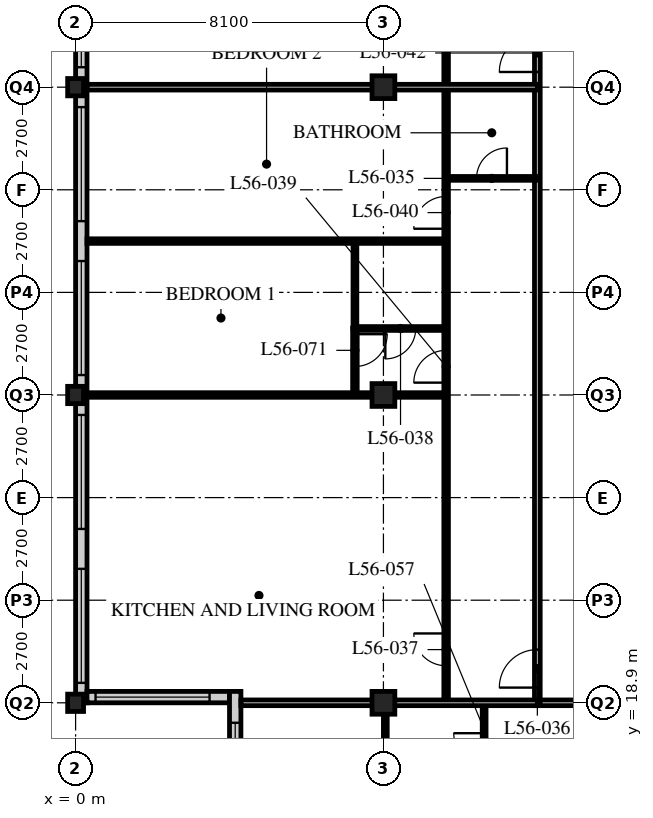
"""IFC4 building model, lengths in metres.
Left out: names, types, materials, properties, quantities, classifications, styles, units other than length and angle.
Written with IfcOpenShell. Run it as: python <this file> out.ifc"""

import sys

from ifc_helpers import new_model, si_unit, direction, frame, frame_2d, origin, origin_2d, place, context, subcontext, project, spatial, rectangle, hollow_rectangle, i_section, extrude, element, fill, save


model = new_model("IFC4")
c1 = context("Model", 3, precision=1e-05, world=origin(), true_north=direction((0.0, 1.0)))
c2 = subcontext(c1, "Body", "Model", "MODEL_VIEW")
j1 = project(units=[si_unit("LENGTHUNIT", "METRE"), si_unit("PLANEANGLEUNIT", "RADIAN")], contexts=[c1])
p1 = place(None, origin())
s1 = spatial("IfcSite", under=j1, at=p1, CompositionType="ELEMENT")
p2 = place(p1, origin())
s2 = spatial("IfcBuilding", under=s1, at=p2, CompositionType="ELEMENT")
p3 = place(p2, frame((0.0, 0.0, 217.2)))
s3 = spatial("IfcBuildingStorey", under=s2, at=p3, CompositionType="ELEMENT", Elevation=217.2)
for number, where, z_axis, x_axis in (
    (1, (0.0, 18.9, 0.0), (0.0, 0.0, 1.0), (1.0, 0.0, 0.0)),
    (2, (0.0, 27.0, 0.0), (0.0, 0.0, 1.0), (1.0, 0.0, 0.0)),
    (3, (0.0, 35.1, 0.0), (0.0, 0.0, 1.0), (1.0, 0.0, 0.0)),
):
    element("IfcColumn", number, at=place(p3, frame(where, z_axis=z_axis, x_axis=x_axis)), inside=s3, PredefinedType="COLUMN", context=c2, shape_type="SweptSolid", body=[
        extrude(i_section(OverallWidth=0.418, OverallDepth=0.456, WebThickness=0.042, FlangeThickness=0.067, FilletRadius=0.015, at=origin_2d()), origin(), (0.0, 0.0, 1.0), 3.6),
    ])
for number, where, z_axis, x_axis in (
    (4, (8.1, 18.9, 0.0), (0.0, 0.0, 1.0), (1.0, 0.0, 0.0)),
    (5, (8.1, 27.0, 0.0), (0.0, 0.0, 1.0), (1.0, 0.0, 0.0)),
    (6, (8.1, 35.1, 0.0), (0.0, 0.0, 1.0), (1.0, 0.0, 0.0)),
):
    element("IfcColumn", number, at=place(p3, frame(where, z_axis=z_axis, x_axis=x_axis)), inside=s3, PredefinedType="COLUMN", context=c2, shape_type="SweptSolid", body=[
        extrude(hollow_rectangle(XDim=0.6, YDim=0.6, WallThickness=0.05, at=origin_2d()), origin(), (0.0, 0.0, 1.0), 3.6),
    ])
p4 = place(p3, frame((0.15, 51.0, 0.0), z_axis=(0.0, 0.0, 1.0), x_axis=(0.0, -1.0, 0.0)))
e7 = element("IfcWall", 7, at=p4, inside=s3, PredefinedType="SOLIDWALL", context=c2, shape_type="SweptSolid", body=[
    extrude(rectangle(XDim=32.1, YDim=0.3, at=frame_2d((16.05, 0.0))), origin(), (0.0, 0.0, 1.0), 3.39),
])
p5 = place(p4, frame((0.225, 0.0, 0.6)))
e8 = element("IfcOpeningElement", 8, at=p5, cuts=e7, PredefinedType="OPENING", context=c2, shape_type="SweptSolid", body=[
    extrude(rectangle(XDim=3.0, YDim=2.4, at=frame_2d((1.5, 1.2))), frame((0.0, 0.16, 0.0), z_axis=(0.0, -1.0, 0.0), x_axis=(1.0, 0.0, 0.0)), (0.0, 0.0, 1.0), 0.32),
])
p6 = place(p4, frame((4.275, 0.0, 0.6)))
e9 = element("IfcOpeningElement", 9, at=p6, cuts=e7, PredefinedType="OPENING", context=c2, shape_type="SweptSolid", body=[
    extrude(rectangle(XDim=3.0, YDim=2.4, at=frame_2d((1.5, 1.2))), frame((0.0, 0.16, 0.0), z_axis=(0.0, -1.0, 0.0), x_axis=(1.0, 0.0, 0.0)), (0.0, 0.0, 1.0), 0.32),
])
p7 = place(p4, frame((8.325, 0.0, 0.6)))
e10 = element("IfcOpeningElement", 10, at=p7, cuts=e7, PredefinedType="OPENING", context=c2, shape_type="SweptSolid", body=[
    extrude(rectangle(XDim=3.0, YDim=2.4, at=frame_2d((1.5, 1.2))), frame((0.0, 0.16, 0.0), z_axis=(0.0, -1.0, 0.0), x_axis=(1.0, 0.0, 0.0)), (0.0, 0.0, 1.0), 0.32),
])
p8 = place(p4, frame((12.375, 0.0, 0.6)))
e11 = element("IfcOpeningElement", 11, at=p8, cuts=e7, PredefinedType="OPENING", context=c2, shape_type="SweptSolid", body=[
    extrude(rectangle(XDim=3.0, YDim=2.4, at=frame_2d((1.5, 1.2))), frame((0.0, 0.16, 0.0), z_axis=(0.0, -1.0, 0.0), x_axis=(1.0, 0.0, 0.0)), (0.0, 0.0, 1.0), 0.32),
])
p9 = place(p4, frame((16.425, 0.0, 0.6)))
e12 = element("IfcOpeningElement", 12, at=p9, cuts=e7, PredefinedType="OPENING", context=c2, shape_type="SweptSolid", body=[
    extrude(rectangle(XDim=3.0, YDim=2.4, at=frame_2d((1.5, 1.2))), frame((0.0, 0.16, 0.0), z_axis=(0.0, -1.0, 0.0), x_axis=(1.0, 0.0, 0.0)), (0.0, 0.0, 1.0), 0.32),
])
p10 = place(p4, frame((20.475, 0.0, 0.6)))
e13 = element("IfcOpeningElement", 13, at=p10, cuts=e7, PredefinedType="OPENING", context=c2, shape_type="SweptSolid", body=[
    extrude(rectangle(XDim=3.0, YDim=2.4, at=frame_2d((1.5, 1.2))), frame((0.0, 0.16, 0.0), z_axis=(0.0, -1.0, 0.0), x_axis=(1.0, 0.0, 0.0)), (0.0, 0.0, 1.0), 0.32),
])
p11 = place(p4, frame((24.525, 0.0, 0.6)))
e14 = element("IfcOpeningElement", 14, at=p11, cuts=e7, PredefinedType="OPENING", context=c2, shape_type="SweptSolid", body=[
    extrude(rectangle(XDim=3.0, YDim=2.4, at=frame_2d((1.5, 1.2))), frame((0.0, 0.16, 0.0), z_axis=(0.0, -1.0, 0.0), x_axis=(1.0, 0.0, 0.0)), (0.0, 0.0, 1.0), 0.32),
])
p12 = place(p4, frame((28.575, 0.0, 0.6)))
e15 = element("IfcOpeningElement", 15, at=p12, cuts=e7, PredefinedType="OPENING", context=c2, shape_type="SweptSolid", body=[
    extrude(rectangle(XDim=3.0, YDim=2.4, at=frame_2d((1.5, 1.2))), frame((0.0, 0.16, 0.0), z_axis=(0.0, -1.0, 0.0), x_axis=(1.0, 0.0, 0.0)), (0.0, 0.0, 1.0), 0.32),
])
p13 = place(p3, frame((0.3, 19.05, 0.0), z_axis=(0.0, 0.0, 1.0), x_axis=(1.0, 0.0, 0.0)))
e16 = element("IfcWall", 16, at=p13, inside=s3, PredefinedType="SOLIDWALL", context=c2, shape_type="SweptSolid", body=[
    extrude(rectangle(XDim=3.75, YDim=0.3, at=frame_2d((1.875, 0.0))), origin(), (0.0, 0.0, 1.0), 3.39),
])
p14 = place(p13, frame((0.225, 0.0, 0.6)))
e17 = element("IfcOpeningElement", 17, at=p14, cuts=e16, PredefinedType="OPENING", context=c2, shape_type="SweptSolid", body=[
    extrude(rectangle(XDim=3.0, YDim=2.0, at=frame_2d((1.5, 1.0))), frame((0.0, 0.16, 0.0), z_axis=(0.0, -1.0, 0.0), x_axis=(1.0, 0.0, 0.0)), (0.0, 0.0, 1.0), 0.32),
])
p15 = place(p3, frame((4.2, 19.2, 0.0), z_axis=(0.0, 0.0, 1.0), x_axis=(0.0, -1.0, 0.0)))
e18 = element("IfcWall", 18, at=p15, inside=s3, PredefinedType="SOLIDWALL", context=c2, shape_type="SweptSolid", body=[
    extrude(rectangle(XDim=4.35, YDim=0.3, at=frame_2d((2.175, 0.0))), origin(), (0.0, 0.0, 1.0), 3.39),
])
p16 = place(p15, frame((0.825, 0.0, 0.6)))
e19 = element("IfcOpeningElement", 19, at=p16, cuts=e18, PredefinedType="OPENING", context=c2, shape_type="SweptSolid", body=[
    extrude(rectangle(XDim=3.0, YDim=2.0, at=frame_2d((1.5, 1.0))), frame((0.0, 0.16, 0.0), z_axis=(0.0, -1.0, 0.0), x_axis=(1.0, 0.0, 0.0)), (0.0, 0.0, 1.0), 0.32),
])
p17 = place(p3, frame((12.15, 18.9, 0.0), z_axis=(0.0, 0.0, 1.0), x_axis=(1.0, 0.0, 0.0)))
e20 = element("IfcWall", 20, at=p17, inside=s3, PredefinedType="PARTITIONING", context=c2, shape_type="SweptSolid", body=[
    extrude(rectangle(XDim=36.45, YDim=0.15, at=frame_2d((18.225, 0.0))), origin(), (0.0, 0.0, 1.0), 2.778),
])
p18 = place(p17, frame((4.95, 0.0, 0.0)))
e21 = element("IfcOpeningElement", 21, at=p18, cuts=e20, PredefinedType="OPENING", context=c2, shape_type="SweptSolid", body=[
    extrude(rectangle(XDim=1.0, YDim=2.1, at=frame_2d((0.5, 1.05))), frame((0.0, 0.085, 0.0), z_axis=(0.0, -1.0, 0.0), x_axis=(1.0, 0.0, 0.0)), (0.0, 0.0, 1.0), 0.17),
])
p19 = place(p17, frame((22.6, 0.0, 0.0)))
e22 = element("IfcOpeningElement", 22, at=p19, cuts=e20, PredefinedType="OPENING", context=c2, shape_type="SweptSolid", body=[
    extrude(rectangle(XDim=1.0, YDim=2.1, at=frame_2d((0.5, 1.05))), frame((0.0, 0.085, 0.0), z_axis=(0.0, -1.0, 0.0), x_axis=(1.0, 0.0, 0.0)), (0.0, 0.0, 1.0), 0.17),
])
p20 = place(p17, frame((25.0, 0.0, 0.0)))
e23 = element("IfcOpeningElement", 23, at=p20, cuts=e20, PredefinedType="OPENING", context=c2, shape_type="SweptSolid", body=[
    extrude(rectangle(XDim=1.0, YDim=2.1, at=frame_2d((0.5, 1.05))), frame((0.0, 0.085, 0.0), z_axis=(0.0, -1.0, 0.0), x_axis=(1.0, 0.0, 0.0)), (0.0, 0.0, 1.0), 0.17),
])
p21 = place(p17, frame((30.7, 0.0, 0.0)))
e24 = element("IfcOpeningElement", 24, at=p21, cuts=e20, PredefinedType="OPENING", context=c2, shape_type="SweptSolid", body=[
    extrude(rectangle(XDim=1.0, YDim=2.1, at=frame_2d((0.5, 1.05))), frame((0.0, 0.085, 0.0), z_axis=(0.0, -1.0, 0.0), x_axis=(1.0, 0.0, 0.0)), (0.0, 0.0, 1.0), 0.17),
])
p22 = place(p17, frame((1.525, 0.0, 0.0)))
e25 = element("IfcOpeningElement", 25, at=p22, cuts=e20, PredefinedType="OPENING", context=c2, shape_type="SweptSolid", body=[
    extrude(rectangle(XDim=1.0, YDim=2.1, at=frame_2d((0.5, 1.05))), frame((0.0, 0.085, 0.0), z_axis=(0.0, -1.0, 0.0), x_axis=(1.0, 0.0, 0.0)), (0.0, 0.0, 1.0), 0.17),
])
p23 = place(p17, frame((32.825, 0.0, 0.0)))
e26 = element("IfcOpeningElement", 26, at=p23, cuts=e20, PredefinedType="OPENING", context=c2, shape_type="SweptSolid", body=[
    extrude(rectangle(XDim=1.0, YDim=2.1, at=frame_2d((0.5, 1.05))), frame((0.0, 0.085, 0.0), z_axis=(0.0, -1.0, 0.0), x_axis=(1.0, 0.0, 0.0)), (0.0, 0.0, 1.0), 0.17),
])
p24 = place(p3, frame((12.15, 18.9, 0.0), z_axis=(0.0, 0.0, 1.0), x_axis=(0.0, 1.0, 0.0)))
e27 = element("IfcWall", 27, at=p24, inside=s3, PredefinedType="PARTITIONING", context=c2, shape_type="SweptSolid", body=[
    extrude(rectangle(XDim=24.3, YDim=0.15, at=frame_2d((12.15, 0.0))), origin(), (0.0, 0.0, 1.0), 3.39),
])
p25 = place(p24, frame((0.4, 0.0, 0.0)))
e28 = element("IfcOpeningElement", 28, at=p25, cuts=e27, PredefinedType="OPENING", context=c2, shape_type="SweptSolid", body=[
    extrude(rectangle(XDim=1.0, YDim=2.1, at=frame_2d((0.5, 1.05))), frame((0.0, 0.085, 0.0), z_axis=(0.0, -1.0, 0.0), x_axis=(1.0, 0.0, 0.0)), (0.0, 0.0, 1.0), 0.17),
])
p26 = place(p24, frame((16.6, 0.0, 0.0)))
e29 = element("IfcOpeningElement", 29, at=p26, cuts=e27, PredefinedType="OPENING", context=c2, shape_type="SweptSolid", body=[
    extrude(rectangle(XDim=1.0, YDim=2.1, at=frame_2d((0.5, 1.05))), frame((0.0, 0.085, 0.0), z_axis=(0.0, -1.0, 0.0), x_axis=(1.0, 0.0, 0.0)), (0.0, 0.0, 1.0), 0.17),
])
p27 = place(p3, frame((9.75, 18.9, 0.0), z_axis=(0.0, 0.0, 1.0), x_axis=(0.0, 1.0, 0.0)))
e30 = element("IfcWall", 30, at=p27, inside=s3, PredefinedType="PARTITIONING", context=c2, shape_type="SweptSolid", body=[
    extrude(rectangle(XDim=24.3, YDim=0.12, at=frame_2d((12.15, 0.0))), origin(), (0.0, 0.0, 1.0), 3.39),
])
p28 = place(p27, frame((0.975, 0.0, 0.0)))
e31 = element("IfcOpeningElement", 31, at=p28, cuts=e30, PredefinedType="OPENING", context=c2, shape_type="SweptSolid", body=[
    extrude(rectangle(XDim=0.85, YDim=2.1, at=frame_2d((0.425, 1.05))), frame((0.0, 0.07, 0.0), z_axis=(0.0, -1.0, 0.0), x_axis=(1.0, 0.0, 0.0)), (0.0, 0.0, 1.0), 0.14),
])
p29 = place(p27, frame((8.425, 0.0, 0.0)))
e32 = element("IfcOpeningElement", 32, at=p29, cuts=e30, PredefinedType="OPENING", context=c2, shape_type="SweptSolid", body=[
    extrude(rectangle(XDim=0.85, YDim=2.1, at=frame_2d((0.425, 1.05))), frame((0.0, 0.07, 0.0), z_axis=(0.0, -1.0, 0.0), x_axis=(1.0, 0.0, 0.0)), (0.0, 0.0, 1.0), 0.14),
])
p30 = place(p27, frame((12.475, 0.0, 0.0)))
e33 = element("IfcOpeningElement", 33, at=p30, cuts=e30, PredefinedType="OPENING", context=c2, shape_type="SweptSolid", body=[
    extrude(rectangle(XDim=0.85, YDim=2.1, at=frame_2d((0.425, 1.05))), frame((0.0, 0.07, 0.0), z_axis=(0.0, -1.0, 0.0), x_axis=(1.0, 0.0, 0.0)), (0.0, 0.0, 1.0), 0.14),
])
p31 = place(p27, frame((17.175, 0.0, 0.0)))
e34 = element("IfcOpeningElement", 34, at=p31, cuts=e30, PredefinedType="OPENING", context=c2, shape_type="SweptSolid", body=[
    extrude(rectangle(XDim=0.85, YDim=2.1, at=frame_2d((0.425, 1.05))), frame((0.0, 0.07, 0.0), z_axis=(0.0, -1.0, 0.0), x_axis=(1.0, 0.0, 0.0)), (0.0, 0.0, 1.0), 0.14),
])
p32 = place(p27, frame((20.575, 0.0, 0.0)))
e35 = element("IfcOpeningElement", 35, at=p32, cuts=e30, PredefinedType="OPENING", context=c2, shape_type="SweptSolid", body=[
    extrude(rectangle(XDim=0.85, YDim=2.1, at=frame_2d((0.425, 1.05))), frame((0.0, 0.07, 0.0), z_axis=(0.0, -1.0, 0.0), x_axis=(1.0, 0.0, 0.0)), (0.0, 0.0, 1.0), 0.14),
])
p33 = place(p3, frame((12.15, 32.7, 0.0), z_axis=(0.0, 0.0, 1.0), x_axis=(-1.0, 0.0, 0.0)))
e36 = element("IfcWall", 36, at=p33, inside=s3, PredefinedType="PARTITIONING", context=c2, shape_type="SweptSolid", body=[
    extrude(rectangle(XDim=2.4, YDim=0.1, at=frame_2d((1.2, 0.0))), origin(), (0.0, 0.0, 1.0), 3.39),
])
p34 = place(p33, frame((0.8, 0.0, 0.0)))
e37 = element("IfcOpeningElement", 37, at=p34, cuts=e36, PredefinedType="OPENING", context=c2, shape_type="SweptSolid", body=[
    extrude(rectangle(XDim=0.8, YDim=2.1, at=frame_2d((0.4, 1.05))), frame((0.0, 0.06, 0.0), z_axis=(0.0, -1.0, 0.0), x_axis=(1.0, 0.0, 0.0)), (0.0, 0.0, 1.0), 0.12),
])
p35 = place(p3, frame((9.75, 28.75, 0.0), z_axis=(0.0, 0.0, 1.0), x_axis=(-1.0, 0.0, 0.0)))
e38 = element("IfcWall", 38, at=p35, inside=s3, PredefinedType="PARTITIONING", context=c2, shape_type="SweptSolid", body=[
    extrude(rectangle(XDim=2.4, YDim=0.1, at=frame_2d((1.2, 0.0))), origin(), (0.0, 0.0, 1.0), 3.39),
])
p36 = place(p35, frame((0.8, 0.0, 0.0)))
e39 = element("IfcOpeningElement", 39, at=p36, cuts=e38, PredefinedType="OPENING", context=c2, shape_type="SweptSolid", body=[
    extrude(rectangle(XDim=0.8, YDim=2.1, at=frame_2d((0.4, 1.05))), frame((0.0, 0.06, 0.0), z_axis=(0.0, -1.0, 0.0), x_axis=(1.0, 0.0, 0.0)), (0.0, 0.0, 1.0), 0.12),
])
p37 = place(p3, frame((7.35, 28.75, 0.0), z_axis=(0.0, 0.0, 1.0), x_axis=(0.0, 1.0, 0.0)))
e40 = element("IfcWall", 40, at=p37, inside=s3, PredefinedType="PARTITIONING", context=c2, shape_type="SweptSolid", body=[
    extrude(rectangle(XDim=2.3, YDim=0.1, at=frame_2d((1.15, 0.0))), origin(), (0.0, 0.0, 1.0), 3.39),
])
p38 = place(p3, frame((9.75, 27.0, 0.0), z_axis=(0.0, 0.0, 1.0), x_axis=(-1.0, 0.0, 0.0)))
e41 = element("IfcWall", 41, at=p38, inside=s3, PredefinedType="PARTITIONING", context=c2, shape_type="SweptSolid", body=[
    extrude(rectangle(XDim=9.45, YDim=0.12, at=frame_2d((4.725, 0.0))), origin(), (0.0, 0.0, 1.0), 2.778),
])
p39 = place(p3, frame((9.75, 31.05, 0.0), z_axis=(0.0, 0.0, 1.0), x_axis=(-1.0, 0.0, 0.0)))
e42 = element("IfcWall", 42, at=p39, inside=s3, PredefinedType="PARTITIONING", context=c2, shape_type="SweptSolid", body=[
    extrude(rectangle(XDim=9.45, YDim=0.12, at=frame_2d((4.725, 0.0))), origin(), (0.0, 0.0, 1.0), 3.39),
])
p40 = place(p3, frame((12.15, 35.1, 0.0), z_axis=(0.0, 0.0, 1.0), x_axis=(-1.0, 0.0, 0.0)))
e43 = element("IfcWall", 43, at=p40, inside=s3, PredefinedType="PARTITIONING", context=c2, shape_type="SweptSolid", body=[
    extrude(rectangle(XDim=11.85, YDim=0.15, at=frame_2d((5.925, 0.0))), origin(), (0.0, 0.0, 1.0), 2.778),
])
p41 = place(p3, frame((10.75, 18.9, 0.0), z_axis=(0.0, 0.0, 1.0), x_axis=(0.0, -1.0, 0.0)))
e44 = element("IfcWall", 44, at=p41, inside=s3, PredefinedType="PARTITIONING", context=c2, shape_type="SweptSolid", body=[
    extrude(rectangle(XDim=2.4, YDim=0.1, at=frame_2d((1.2, 0.0))), origin(), (0.0, 0.0, 1.0), 3.39),
])
p42 = place(p41, frame((0.8, 0.0, 0.0)))
e45 = element("IfcOpeningElement", 45, at=p42, cuts=e44, PredefinedType="OPENING", context=c2, shape_type="SweptSolid", body=[
    extrude(rectangle(XDim=0.8, YDim=2.1, at=frame_2d((0.4, 1.05))), frame((0.0, 0.06, 0.0), z_axis=(0.0, -1.0, 0.0), x_axis=(1.0, 0.0, 0.0)), (0.0, 0.0, 1.0), 0.12),
])
p43 = place(p3, frame((8.15, 18.9, 0.0), z_axis=(0.0, 0.0, 1.0), x_axis=(0.0, -1.0, 0.0)))
e46 = element("IfcWall", 46, at=p43, inside=s3, PredefinedType="PARTITIONING", context=c2, shape_type="SweptSolid", body=[
    extrude(rectangle(XDim=2.4, YDim=0.1, at=frame_2d((1.2, 0.0))), origin(), (0.0, 0.0, 1.0), 2.778),
])
p44 = place(p3, frame((4.35, 18.9, 0.0), z_axis=(0.0, 0.0, 1.0), x_axis=(1.0, 0.0, 0.0)))
e47 = element("IfcWall", 47, at=p44, inside=s3, PredefinedType="PARTITIONING", context=c2, shape_type="SweptSolid", body=[
    extrude(rectangle(XDim=7.8, YDim=0.15, at=frame_2d((3.9, 0.0))), origin(), (0.0, 0.0, 1.0), 2.778),
])
p45 = place(p3, frame((7.35, 27.0, 0.0), z_axis=(0.0, 0.0, 1.0), x_axis=(0.0, 1.0, 0.0)))
e48 = element("IfcWall", 48, at=p45, inside=s3, PredefinedType="PARTITIONING", context=c2, shape_type="SweptSolid", body=[
    extrude(rectangle(XDim=1.76, YDim=0.12, at=frame_2d((0.88, 0.0))), origin(), (0.0, 0.0, 1.0), 3.39),
])
p46 = place(p45, frame((0.75, 0.0, 0.0)))
e49 = element("IfcOpeningElement", 49, at=p46, cuts=e48, PredefinedType="OPENING", context=c2, shape_type="SweptSolid", body=[
    extrude(rectangle(XDim=0.85, YDim=2.1, at=frame_2d((0.425, 1.05))), frame((0.0, 0.07, 0.0), z_axis=(0.0, -1.0, 0.0), x_axis=(1.0, 0.0, 0.0)), (0.0, 0.0, 1.0), 0.14),
])
p47 = place(p8, origin())
e50 = element("IfcWindow", 50, at=p47, inside=s3, PartitioningType="SINGLE_PANEL", PredefinedType="WINDOW", context=c2, shape_type="SweptSolid", body=[
    extrude(rectangle(XDim=3.0, YDim=2.4, at=frame_2d((1.5, 1.2))), frame((0.0, 0.03, 0.0), z_axis=(0.0, -1.0, 0.0), x_axis=(1.0, 0.0, 0.0)), (0.0, 0.0, 1.0), 0.06),
])
fill(e11, e50)
p48 = place(p9, origin())
e51 = element("IfcWindow", 51, at=p48, inside=s3, PartitioningType="SINGLE_PANEL", PredefinedType="WINDOW", context=c2, shape_type="SweptSolid", body=[
    extrude(rectangle(XDim=3.0, YDim=2.4, at=frame_2d((1.5, 1.2))), frame((0.0, 0.03, 0.0), z_axis=(0.0, -1.0, 0.0), x_axis=(1.0, 0.0, 0.0)), (0.0, 0.0, 1.0), 0.06),
])
fill(e12, e51)
p49 = place(p10, origin())
e52 = element("IfcWindow", 52, at=p49, inside=s3, PartitioningType="SINGLE_PANEL", PredefinedType="WINDOW", context=c2, shape_type="SweptSolid", body=[
    extrude(rectangle(XDim=3.0, YDim=2.4, at=frame_2d((1.5, 1.2))), frame((0.0, 0.03, 0.0), z_axis=(0.0, -1.0, 0.0), x_axis=(1.0, 0.0, 0.0)), (0.0, 0.0, 1.0), 0.06),
])
fill(e13, e52)
p50 = place(p11, origin())
e53 = element("IfcWindow", 53, at=p50, inside=s3, PartitioningType="SINGLE_PANEL", PredefinedType="WINDOW", context=c2, shape_type="SweptSolid", body=[
    extrude(rectangle(XDim=3.0, YDim=2.4, at=frame_2d((1.5, 1.2))), frame((0.0, 0.03, 0.0), z_axis=(0.0, -1.0, 0.0), x_axis=(1.0, 0.0, 0.0)), (0.0, 0.0, 1.0), 0.06),
])
fill(e14, e53)
p51 = place(p12, origin())
e54 = element("IfcWindow", 54, at=p51, inside=s3, PartitioningType="SINGLE_PANEL", PredefinedType="WINDOW", context=c2, shape_type="SweptSolid", body=[
    extrude(rectangle(XDim=3.0, YDim=2.4, at=frame_2d((1.5, 1.2))), frame((0.0, 0.03, 0.0), z_axis=(0.0, -1.0, 0.0), x_axis=(1.0, 0.0, 0.0)), (0.0, 0.0, 1.0), 0.06),
])
fill(e15, e54)
p52 = place(p14, origin())
e55 = element("IfcWindow", 55, at=p52, inside=s3, PartitioningType="SINGLE_PANEL", PredefinedType="WINDOW", context=c2, shape_type="SweptSolid", body=[
    extrude(rectangle(XDim=3.0, YDim=2.0, at=frame_2d((1.5, 1.0))), frame((0.0, 0.03, 0.0), z_axis=(0.0, -1.0, 0.0), x_axis=(1.0, 0.0, 0.0)), (0.0, 0.0, 1.0), 0.06),
])
fill(e17, e55)
p53 = place(p16, origin())
e56 = element("IfcWindow", 56, at=p53, inside=s3, PartitioningType="SINGLE_PANEL", PredefinedType="WINDOW", context=c2, shape_type="SweptSolid", body=[
    extrude(rectangle(XDim=3.0, YDim=2.0, at=frame_2d((1.5, 1.0))), frame((0.0, 0.03, 0.0), z_axis=(0.0, -1.0, 0.0), x_axis=(1.0, 0.0, 0.0)), (0.0, 0.0, 1.0), 0.06),
])
fill(e19, e56)
p54 = place(p34, origin())
e57 = element("IfcDoor", 57, at=p54, inside=s3, OperationType="SINGLE_SWING_RIGHT", PredefinedType="DOOR", context=c2, shape_type="SweptSolid", body=[
    extrude(rectangle(XDim=0.8, YDim=2.1, at=frame_2d((0.4, 1.05))), frame((0.0, 0.025, 0.0), z_axis=(0.0, -1.0, 0.0), x_axis=(1.0, 0.0, 0.0)), (0.0, 0.0, 1.0), 0.05),
])
fill(e37, e57)
p55 = place(p25, origin())
e58 = element("IfcDoor", 58, at=p55, inside=s3, OperationType="SINGLE_SWING_LEFT", PredefinedType="DOOR", context=c2, shape_type="SweptSolid", body=[
    extrude(rectangle(XDim=1.0, YDim=2.1, at=frame_2d((0.5, 1.05))), frame((0.0, 0.025, 0.0), z_axis=(0.0, -1.0, 0.0), x_axis=(1.0, 0.0, 0.0)), (0.0, 0.0, 1.0), 0.05),
])
fill(e28, e58)
p56 = place(p28, origin())
e59 = element("IfcDoor", 59, at=p56, inside=s3, OperationType="SINGLE_SWING_RIGHT", PredefinedType="DOOR", context=c2, shape_type="SweptSolid", body=[
    extrude(rectangle(XDim=0.85, YDim=2.1, at=frame_2d((0.425, 1.05))), frame((0.0, 0.025, 0.0), z_axis=(0.0, -1.0, 0.0), x_axis=(1.0, 0.0, 0.0)), (0.0, 0.0, 1.0), 0.05),
])
fill(e31, e59)
p57 = place(p36, origin())
e60 = element("IfcDoor", 60, at=p57, inside=s3, OperationType="SINGLE_SWING_RIGHT", PredefinedType="DOOR", context=c2, shape_type="SweptSolid", body=[
    extrude(rectangle(XDim=0.8, YDim=2.1, at=frame_2d((0.4, 1.05))), frame((0.0, 0.025, 0.0), z_axis=(0.0, -1.0, 0.0), x_axis=(1.0, 0.0, 0.0)), (0.0, 0.0, 1.0), 0.05),
])
fill(e39, e60)
p58 = place(p29, origin())
e61 = element("IfcDoor", 61, at=p58, inside=s3, OperationType="SINGLE_SWING_LEFT", PredefinedType="DOOR", context=c2, shape_type="SweptSolid", body=[
    extrude(rectangle(XDim=0.85, YDim=2.1, at=frame_2d((0.425, 1.05))), frame((0.0, 0.025, 0.0), z_axis=(0.0, -1.0, 0.0), x_axis=(1.0, 0.0, 0.0)), (0.0, 0.0, 1.0), 0.05),
])
fill(e32, e61)
p59 = place(p30, origin())
e62 = element("IfcDoor", 62, at=p59, inside=s3, OperationType="SINGLE_SWING_LEFT", PredefinedType="DOOR", context=c2, shape_type="SweptSolid", body=[
    extrude(rectangle(XDim=0.85, YDim=2.1, at=frame_2d((0.425, 1.05))), frame((0.0, 0.025, 0.0), z_axis=(0.0, -1.0, 0.0), x_axis=(1.0, 0.0, 0.0)), (0.0, 0.0, 1.0), 0.05),
])
fill(e33, e62)
p60 = place(p26, origin())
e63 = element("IfcDoor", 63, at=p60, inside=s3, OperationType="SINGLE_SWING_LEFT", PredefinedType="DOOR", context=c2, shape_type="SweptSolid", body=[
    extrude(rectangle(XDim=1.0, YDim=2.1, at=frame_2d((0.5, 1.05))), frame((0.0, 0.025, 0.0), z_axis=(0.0, -1.0, 0.0), x_axis=(1.0, 0.0, 0.0)), (0.0, 0.0, 1.0), 0.05),
])
fill(e29, e63)
p61 = place(p42, origin())
e64 = element("IfcDoor", 64, at=p61, inside=s3, OperationType="SINGLE_SWING_RIGHT", PredefinedType="DOOR", context=c2, shape_type="SweptSolid", body=[
    extrude(rectangle(XDim=0.8, YDim=2.1, at=frame_2d((0.4, 1.05))), frame((0.0, 0.025, 0.0), z_axis=(0.0, -1.0, 0.0), x_axis=(1.0, 0.0, 0.0)), (0.0, 0.0, 1.0), 0.05),
])
fill(e45, e64)
p62 = place(p46, origin())
e65 = element("IfcDoor", 65, at=p62, inside=s3, OperationType="SINGLE_SWING_LEFT", PredefinedType="DOOR", context=c2, shape_type="SweptSolid", body=[
    extrude(rectangle(XDim=0.85, YDim=2.1, at=frame_2d((0.425, 1.05))), frame((0.0, 0.025, 0.0), z_axis=(0.0, -1.0, 0.0), x_axis=(1.0, 0.0, 0.0)), (0.0, 0.0, 1.0), 0.05),
])
fill(e49, e65)
save(model, sys.argv[1])
